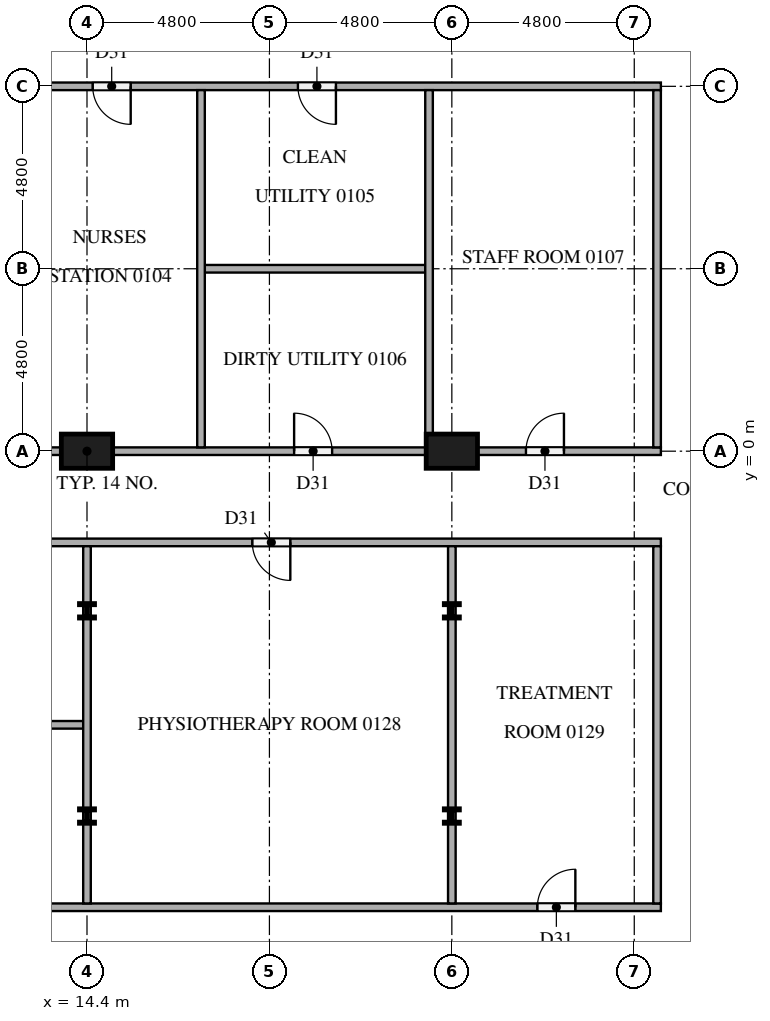
"""IFC4 building model, lengths in metres.
Left out: names, types, materials, properties, quantities, classifications, styles, units other than length and angle.
Written with IfcOpenShell. Run it as: python <this file> out.ifc"""

import sys

from ifc_helpers import new_model, si_unit, direction, frame, frame_2d, origin, origin_2d, place, context, subcontext, project, spatial, rectangle, i_section, extrude, element, fill, save


model = new_model("IFC4")
c1 = context("Model", 3, precision=1e-05, world=origin(), true_north=direction((0.0, 1.0)))
c2 = subcontext(c1, "Body", "Model", "MODEL_VIEW")
j1 = project(units=[si_unit("LENGTHUNIT", "METRE"), si_unit("PLANEANGLEUNIT", "RADIAN")], contexts=[c1])
p1 = place(None, origin())
s1 = spatial("IfcSite", under=j1, at=p1, CompositionType="ELEMENT")
p2 = place(p1, origin())
s2 = spatial("IfcBuilding", under=s1, at=p2, CompositionType="ELEMENT")
p3 = place(p2, frame((0.0, 0.0, 6.0)))
s3 = spatial("IfcBuildingStorey", under=s2, at=p3, CompositionType="ELEMENT", Elevation=6.0)
for number, where, z_axis, x_axis in (
    (1, (14.4, 0.0, 0.0), (0.0, 0.0, 1.0), (1.0, 0.0, 0.0)),
    (2, (24.0, 0.0, 0.0), (0.0, 0.0, 1.0), (1.0, 0.0, 0.0)),
):
    element("IfcColumn", number, at=place(p3, frame(where, z_axis=z_axis, x_axis=x_axis)), inside=s3, PredefinedType="COLUMN", context=c2, shape_type="SweptSolid", body=[
        extrude(rectangle(XDim=1.35, YDim=0.9, at=origin_2d()), origin(), (0.0, 0.0, 1.0), 4.2),
    ])
for number, where, z_axis, x_axis in (
    (3, (14.4, -9.6, 0.0), (0.0, 0.0, 1.0), (1.0, 0.0, 0.0)),
    (4, (14.4, -4.2, 0.0), (0.0, 0.0, 1.0), (1.0, 0.0, 0.0)),
    (5, (24.0, -9.6, 0.0), (0.0, 0.0, 1.0), (1.0, 0.0, 0.0)),
    (6, (24.0, -4.2, 0.0), (0.0, 0.0, 1.0), (1.0, 0.0, 0.0)),
):
    element("IfcColumn", number, at=place(p3, frame(where, z_axis=z_axis, x_axis=x_axis)), inside=s3, PredefinedType="COLUMN", context=c2, shape_type="SweptSolid", body=[
        extrude(i_section(OverallWidth=0.396, OverallDepth=0.381, WebThickness=0.019, FlangeThickness=0.03, at=origin_2d()), origin(), (0.0, 0.0, 1.0), 4.2),
    ])
p4 = place(p3, frame((-4.9, -12.0, 0.0), z_axis=(0.0, 0.0, 1.0), x_axis=(1.0, 0.0, 0.0)))
e7 = element("IfcWall", 7, at=p4, inside=s3, PredefinedType="PARTITIONING", context=c2, shape_type="SweptSolid", body=[
    extrude(rectangle(XDim=34.4, YDim=0.2, at=frame_2d((17.2, 0.0))), origin(), (0.0, 0.0, 1.0), 4.2),
])
p5 = place(p4, frame((14.05, 0.0, 0.0)))
e8 = element("IfcOpeningElement", 8, at=p5, cuts=e7, PredefinedType="OPENING", context=c2, shape_type="SweptSolid", body=[
    extrude(rectangle(XDim=1.0, YDim=2.1, at=frame_2d((0.5, 1.05))), frame((0.0, 0.11, 0.0), z_axis=(0.0, -1.0, 0.0), x_axis=(1.0, 0.0, 0.0)), (0.0, 0.0, 1.0), 0.22),
])
p6 = place(p4, frame((31.15, 0.0, 0.0)))
e9 = element("IfcOpeningElement", 9, at=p6, cuts=e7, PredefinedType="OPENING", context=c2, shape_type="SweptSolid", body=[
    extrude(rectangle(XDim=1.0, YDim=2.1, at=frame_2d((0.5, 1.05))), frame((0.0, 0.11, 0.0), z_axis=(0.0, -1.0, 0.0), x_axis=(1.0, 0.0, 0.0)), (0.0, 0.0, 1.0), 0.22),
])
p7 = place(p3, frame((4.9, -7.2, 0.0), z_axis=(0.0, 0.0, 1.0), x_axis=(1.0, 0.0, 0.0)))
e10 = element("IfcWall", 10, at=p7, inside=s3, PredefinedType="PARTITIONING", context=c2, shape_type="SweptSolid", body=[
    extrude(rectangle(XDim=9.4, YDim=0.2, at=frame_2d((4.7, 0.0))), origin(), (0.0, 0.0, 1.0), 4.2),
])
p8 = place(p3, frame((29.5, -2.4, 0.0), z_axis=(0.0, 0.0, 1.0), x_axis=(-1.0, 0.0, 0.0)))
e11 = element("IfcWall", 11, at=p8, inside=s3, PredefinedType="PARTITIONING", context=c2, shape_type="SweptSolid", body=[
    extrude(rectangle(XDim=24.7, YDim=0.2, at=frame_2d((12.35, 0.0))), origin(), (0.0, 0.0, 1.0), 4.2),
])
p9 = place(p8, frame((19.45, 0.0, 0.0)))
e12 = element("IfcOpeningElement", 12, at=p9, cuts=e11, PredefinedType="OPENING", context=c2, shape_type="SweptSolid", body=[
    extrude(rectangle(XDim=1.0, YDim=2.1, at=frame_2d((0.5, 1.05))), frame((0.0, 0.11, 0.0), z_axis=(0.0, -1.0, 0.0), x_axis=(1.0, 0.0, 0.0)), (0.0, 0.0, 1.0), 0.22),
])
p10 = place(p8, frame((9.75, 0.0, 0.0)))
e13 = element("IfcOpeningElement", 13, at=p10, cuts=e11, PredefinedType="OPENING", context=c2, shape_type="SweptSolid", body=[
    extrude(rectangle(XDim=1.0, YDim=2.1, at=frame_2d((0.5, 1.05))), frame((0.0, 0.11, 0.0), z_axis=(0.0, -1.0, 0.0), x_axis=(1.0, 0.0, 0.0)), (0.0, 0.0, 1.0), 0.22),
])
p11 = place(p3, frame((-1.85, 0.0, 0.0), z_axis=(0.0, 0.0, 1.0), x_axis=(1.0, 0.0, 0.0)))
e14 = element("IfcWall", 14, at=p11, inside=s3, PredefinedType="PARTITIONING", context=c2, shape_type="SweptSolid", body=[
    extrude(rectangle(XDim=31.35, YDim=0.2, at=frame_2d((15.675, 0.0))), origin(), (0.0, 0.0, 1.0), 4.2),
])
p12 = place(p11, frame((10.9, 0.0, 0.0)))
e15 = element("IfcOpeningElement", 15, at=p12, cuts=e14, PredefinedType="OPENING", context=c2, shape_type="SweptSolid", body=[
    extrude(rectangle(XDim=1.0, YDim=2.1, at=frame_2d((0.5, 1.05))), frame((0.0, 0.11, 0.0), z_axis=(0.0, -1.0, 0.0), x_axis=(1.0, 0.0, 0.0)), (0.0, 0.0, 1.0), 0.22),
])
p13 = place(p11, frame((21.7, 0.0, 0.0)))
e16 = element("IfcOpeningElement", 16, at=p13, cuts=e14, PredefinedType="OPENING", context=c2, shape_type="SweptSolid", body=[
    extrude(rectangle(XDim=1.0, YDim=2.1, at=frame_2d((0.5, 1.05))), frame((0.0, 0.11, 0.0), z_axis=(0.0, -1.0, 0.0), x_axis=(1.0, 0.0, 0.0)), (0.0, 0.0, 1.0), 0.22),
])
p14 = place(p11, frame((27.8, 0.0, 0.0)))
e17 = element("IfcOpeningElement", 17, at=p14, cuts=e14, PredefinedType="OPENING", context=c2, shape_type="SweptSolid", body=[
    extrude(rectangle(XDim=1.0, YDim=2.1, at=frame_2d((0.5, 1.05))), frame((0.0, 0.11, 0.0), z_axis=(0.0, -1.0, 0.0), x_axis=(1.0, 0.0, 0.0)), (0.0, 0.0, 1.0), 0.22),
])
p15 = place(p3, frame((17.5, 4.8, 0.0), z_axis=(0.0, 0.0, 1.0), x_axis=(1.0, 0.0, 0.0)))
e18 = element("IfcWall", 18, at=p15, inside=s3, PredefinedType="PARTITIONING", context=c2, shape_type="SweptSolid", body=[
    extrude(rectangle(XDim=5.8, YDim=0.2, at=frame_2d((2.9, 0.0))), origin(), (0.0, 0.0, 1.0), 4.2),
])
p16 = place(p3, frame((29.5, 9.6, 0.0), z_axis=(0.0, 0.0, 1.0), x_axis=(-1.0, 0.0, 0.0)))
e19 = element("IfcWall", 19, at=p16, inside=s3, PredefinedType="PARTITIONING", context=c2, shape_type="SweptSolid", body=[
    extrude(rectangle(XDim=34.4, YDim=0.2, at=frame_2d((17.2, 0.0))), origin(), (0.0, 0.0, 1.0), 4.2),
])
p17 = place(p16, frame((31.45, 0.0, 0.0)))
e20 = element("IfcOpeningElement", 20, at=p17, cuts=e19, PredefinedType="OPENING", context=c2, shape_type="SweptSolid", body=[
    extrude(rectangle(XDim=1.0, YDim=2.1, at=frame_2d((0.5, 1.05))), frame((0.0, 0.11, 0.0), z_axis=(0.0, -1.0, 0.0), x_axis=(1.0, 0.0, 0.0)), (0.0, 0.0, 1.0), 0.22),
])
p18 = place(p16, frame((25.65, 0.0, 0.0)))
e21 = element("IfcOpeningElement", 21, at=p18, cuts=e19, PredefinedType="OPENING", context=c2, shape_type="SweptSolid", body=[
    extrude(rectangle(XDim=1.0, YDim=2.1, at=frame_2d((0.5, 1.05))), frame((0.0, 0.11, 0.0), z_axis=(0.0, -1.0, 0.0), x_axis=(1.0, 0.0, 0.0)), (0.0, 0.0, 1.0), 0.22),
])
p19 = place(p16, frame((13.95, 0.0, 0.0)))
e22 = element("IfcOpeningElement", 22, at=p19, cuts=e19, PredefinedType="OPENING", context=c2, shape_type="SweptSolid", body=[
    extrude(rectangle(XDim=1.0, YDim=2.1, at=frame_2d((0.5, 1.05))), frame((0.0, 0.11, 0.0), z_axis=(0.0, -1.0, 0.0), x_axis=(1.0, 0.0, 0.0)), (0.0, 0.0, 1.0), 0.22),
])
p20 = place(p16, frame((8.55, 0.0, 0.0)))
e23 = element("IfcOpeningElement", 23, at=p20, cuts=e19, PredefinedType="OPENING", context=c2, shape_type="SweptSolid", body=[
    extrude(rectangle(XDim=1.0, YDim=2.1, at=frame_2d((0.5, 1.05))), frame((0.0, 0.11, 0.0), z_axis=(0.0, -1.0, 0.0), x_axis=(1.0, 0.0, 0.0)), (0.0, 0.0, 1.0), 0.22),
])
for number, where, z_axis, x_axis in (
    (24, (14.4, -11.9, 0.0), (0.0, 0.0, 1.0), (0.0, 1.0, 0.0)),
    (25, (17.4, 0.1, 0.0), (0.0, 0.0, 1.0), (0.0, 1.0, 0.0)),
    (26, (23.4, 0.1, 0.0), (0.0, 0.0, 1.0), (0.0, 1.0, 0.0)),
    (27, (24.0, -11.9, 0.0), (0.0, 0.0, 1.0), (0.0, 1.0, 0.0)),
    (28, (29.4, -11.9, 0.0), (0.0, 0.0, 1.0), (0.0, 1.0, 0.0)),
    (29, (29.4, 0.1, 0.0), (0.0, 0.0, 1.0), (0.0, 1.0, 0.0)),
):
    element("IfcWall", number, at=place(p3, frame(where, z_axis=z_axis, x_axis=x_axis)), inside=s3, PredefinedType="PARTITIONING", context=c2, shape_type="SweptSolid", body=[
        extrude(rectangle(XDim=9.4, YDim=0.2, at=frame_2d((4.7, 0.0))), origin(), (0.0, 0.0, 1.0), 4.2),
    ])
p21 = place(p19, origin())
e30 = element("IfcDoor", 30, at=p21, inside=s3, OperationType="SINGLE_SWING_LEFT", PredefinedType="DOOR", context=c2, shape_type="SweptSolid", body=[
    extrude(rectangle(XDim=1.0, YDim=2.1, at=frame_2d((0.5, 1.05))), frame((0.0, 0.025, 0.0), z_axis=(0.0, -1.0, 0.0), x_axis=(1.0, 0.0, 0.0)), (0.0, 0.0, 1.0), 0.05),
])
fill(e22, e30)
p22 = place(p20, origin())
e31 = element("IfcDoor", 31, at=p22, inside=s3, OperationType="SINGLE_SWING_LEFT", PredefinedType="DOOR", context=c2, shape_type="SweptSolid", body=[
    extrude(rectangle(XDim=1.0, YDim=2.1, at=frame_2d((0.5, 1.05))), frame((0.0, 0.025, 0.0), z_axis=(0.0, -1.0, 0.0), x_axis=(1.0, 0.0, 0.0)), (0.0, 0.0, 1.0), 0.05),
])
fill(e23, e31)
p23 = place(p13, origin())
e32 = element("IfcDoor", 32, at=p23, inside=s3, OperationType="SINGLE_SWING_LEFT", PredefinedType="DOOR", context=c2, shape_type="SweptSolid", body=[
    extrude(rectangle(XDim=1.0, YDim=2.1, at=frame_2d((0.5, 1.05))), frame((0.0, 0.025, 0.0), z_axis=(0.0, -1.0, 0.0), x_axis=(1.0, 0.0, 0.0)), (0.0, 0.0, 1.0), 0.05),
])
fill(e16, e32)
p24 = place(p14, origin())
e33 = element("IfcDoor", 33, at=p24, inside=s3, OperationType="SINGLE_SWING_RIGHT", PredefinedType="DOOR", context=c2, shape_type="SweptSolid", body=[
    extrude(rectangle(XDim=1.0, YDim=2.1, at=frame_2d((0.5, 1.05))), frame((0.0, 0.025, 0.0), z_axis=(0.0, -1.0, 0.0), x_axis=(1.0, 0.0, 0.0)), (0.0, 0.0, 1.0), 0.05),
])
fill(e17, e33)
p25 = place(p10, origin())
e34 = element("IfcDoor", 34, at=p25, inside=s3, OperationType="SINGLE_SWING_LEFT", PredefinedType="DOOR", context=c2, shape_type="SweptSolid", body=[
    extrude(rectangle(XDim=1.0, YDim=2.1, at=frame_2d((0.5, 1.05))), frame((0.0, 0.025, 0.0), z_axis=(0.0, -1.0, 0.0), x_axis=(1.0, 0.0, 0.0)), (0.0, 0.0, 1.0), 0.05),
])
fill(e13, e34)
p26 = place(p6, origin())
e35 = element("IfcDoor", 35, at=p26, inside=s3, OperationType="SINGLE_SWING_RIGHT", PredefinedType="DOOR", context=c2, shape_type="SweptSolid", body=[
    extrude(rectangle(XDim=1.0, YDim=2.1, at=frame_2d((0.5, 1.05))), frame((0.0, 0.025, 0.0), z_axis=(0.0, -1.0, 0.0), x_axis=(1.0, 0.0, 0.0)), (0.0, 0.0, 1.0), 0.05),
])
fill(e9, e35)
save(model, sys.argv[1])
